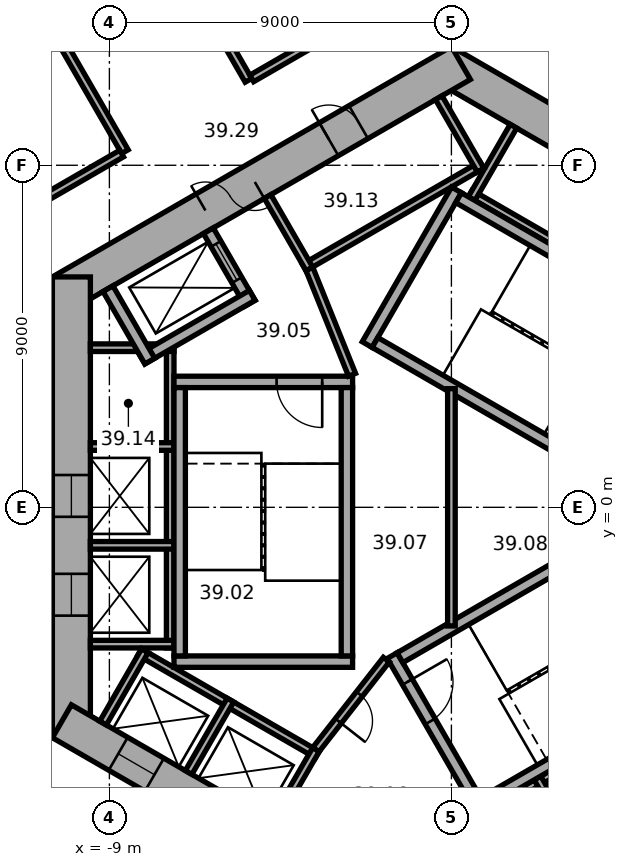
"""IFC4 building model, lengths in metres.
Left out: names, types, materials, properties, quantities, classifications, styles, units other than length and angle.
Written with IfcOpenShell. Run it as: python <this file> out.ifc"""

import sys

from ifc_helpers import new_model, si_unit, direction, frame, frame_2d, origin, place, context, subcontext, project, spatial, rectangle, extrude, element, fill, save


model = new_model("IFC4")
c1 = context("Model", 3, precision=1e-05, world=origin(), true_north=direction((0.0, 1.0)))
c2 = subcontext(c1, "Body", "Model", "MODEL_VIEW")
j1 = project(units=[si_unit("LENGTHUNIT", "METRE"), si_unit("PLANEANGLEUNIT", "RADIAN")], contexts=[c1])
p1 = place(None, origin())
s1 = spatial("IfcSite", under=j1, at=p1, CompositionType="ELEMENT")
p2 = place(p1, origin())
s2 = spatial("IfcBuilding", under=s1, at=p2, CompositionType="ELEMENT")
p3 = place(p2, frame((0.0, 0.0, 161.4)))
s3 = spatial("IfcBuildingStorey", under=s2, at=p3, CompositionType="ELEMENT", Elevation=161.4)
p4 = place(p3, frame((10.25, 5.629, 0.0), z_axis=(0.0, 0.0, 1.0), x_axis=(-0.866022616891, 0.50000482701, 0.0)))
e1 = element("IfcWall", 1, at=p4, inside=s3, PredefinedType="SHEAR", context=c2, shape_type="SweptSolid", body=[
    extrude(rectangle(XDim=12.125, YDim=1.0, at=frame_2d((6.062, 0.0))), origin(), (0.0, 0.0, 1.0), 3.7),
])
p5 = place(p4, frame((2.712, 0.0, 0.0)))
e2 = element("IfcOpeningElement", 2, at=p5, cuts=e1, PredefinedType="OPENING", context=c2, shape_type="SweptSolid", body=[
    extrude(rectangle(XDim=0.9, YDim=2.1, at=frame_2d((0.45, 1.05))), frame((0.0, 0.51, 0.0), z_axis=(0.0, -1.0, 0.0), x_axis=(1.0, 0.0, 0.0)), (0.0, 0.0, 1.0), 1.02),
])
p6 = place(p4, frame((6.612, 0.0, 0.0)))
e3 = element("IfcOpeningElement", 3, at=p6, cuts=e1, PredefinedType="OPENING", context=c2, shape_type="SweptSolid", body=[
    extrude(rectangle(XDim=0.9, YDim=2.1, at=frame_2d((0.45, 1.05))), frame((0.0, 0.51, 0.0), z_axis=(0.0, -1.0, 0.0), x_axis=(1.0, 0.0, 0.0)), (0.0, 0.0, 1.0), 1.02),
])
p7 = place(p3, frame((0.25, 11.691, 0.0), z_axis=(0.0, 0.0, 1.0), x_axis=(-0.866022616891, -0.50000482701, 0.0)))
e4 = element("IfcWall", 4, at=p7, inside=s3, PredefinedType="SHEAR", context=c2, shape_type="SweptSolid", body=[
    extrude(rectangle(XDim=12.125, YDim=1.0, at=frame_2d((6.062, 0.0))), origin(), (0.0, 0.0, 1.0), 3.7),
])
p8 = place(p7, frame((6.262, 0.0, 0.0)))
e5 = element("IfcOpeningElement", 5, at=p8, cuts=e4, PredefinedType="OPENING", context=c2, shape_type="SweptSolid", body=[
    extrude(rectangle(XDim=1.5, YDim=2.1, at=frame_2d((0.75, 1.05))), frame((0.0, 0.51, 0.0), z_axis=(0.0, -1.0, 0.0), x_axis=(1.0, 0.0, 0.0)), (0.0, 0.0, 1.0), 1.02),
])
p9 = place(p7, frame((3.112, 0.0, 0.0)))
e6 = element("IfcOpeningElement", 6, at=p9, cuts=e4, PredefinedType="OPENING", context=c2, shape_type="SweptSolid", body=[
    extrude(rectangle(XDim=0.9, YDim=2.1, at=frame_2d((0.45, 1.05))), frame((0.0, 0.51, 0.0), z_axis=(0.0, -1.0, 0.0), x_axis=(1.0, 0.0, 0.0)), (0.0, 0.0, 1.0), 1.02),
])
p10 = place(p3, frame((-10.0, 6.062, 0.0), z_axis=(0.0, 0.0, 1.0), x_axis=(0.0, -1.0, 0.0)))
e7 = element("IfcWall", 7, at=p10, inside=s3, PredefinedType="SHEAR", context=c2, shape_type="SweptSolid", body=[
    extrude(rectangle(XDim=12.125, YDim=1.0, at=frame_2d((6.062, 0.0))), origin(), (0.0, 0.0, 1.0), 3.7),
])
p11 = place(p10, frame((5.212, 0.0, 0.0)))
e8 = element("IfcOpeningElement", 8, at=p11, cuts=e7, PredefinedType="OPENING", context=c2, shape_type="SweptSolid", body=[
    extrude(rectangle(XDim=1.1, YDim=2.1, at=frame_2d((0.55, 1.05))), frame((0.0, 0.51, 0.0), z_axis=(0.0, -1.0, 0.0), x_axis=(1.0, 0.0, 0.0)), (0.0, 0.0, 1.0), 1.02),
])
p12 = place(p10, frame((7.812, 0.0, 0.0)))
e9 = element("IfcOpeningElement", 9, at=p12, cuts=e7, PredefinedType="OPENING", context=c2, shape_type="SweptSolid", body=[
    extrude(rectangle(XDim=1.1, YDim=2.1, at=frame_2d((0.55, 1.05))), frame((0.0, 0.51, 0.0), z_axis=(0.0, -1.0, 0.0), x_axis=(1.0, 0.0, 0.0)), (0.0, 0.0, 1.0), 1.02),
])
p13 = place(p3, frame((-10.25, -5.629, 0.0), z_axis=(0.0, 0.0, 1.0), x_axis=(0.866022616891, -0.50000482701, 0.0)))
e10 = element("IfcWall", 10, at=p13, inside=s3, PredefinedType="SHEAR", context=c2, shape_type="SweptSolid", body=[
    extrude(rectangle(XDim=12.125, YDim=1.0, at=frame_2d((6.062, 0.0))), origin(), (0.0, 0.0, 1.0), 3.7),
])
p14 = place(p13, frame((6.262, 0.0, 0.0)))
e11 = element("IfcOpeningElement", 11, at=p14, cuts=e10, PredefinedType="OPENING", context=c2, shape_type="SweptSolid", body=[
    extrude(rectangle(XDim=1.5, YDim=2.1, at=frame_2d((0.75, 1.05))), frame((0.0, 0.51, 0.0), z_axis=(0.0, -1.0, 0.0), x_axis=(1.0, 0.0, 0.0)), (0.0, 0.0, 1.0), 1.02),
])
p15 = place(p13, frame((1.712, 0.0, 0.0)))
e12 = element("IfcOpeningElement", 12, at=p15, cuts=e10, PredefinedType="OPENING", context=c2, shape_type="SweptSolid", body=[
    extrude(rectangle(XDim=1.1, YDim=2.1, at=frame_2d((0.55, 1.05))), frame((0.0, 0.51, 0.0), z_axis=(0.0, -1.0, 0.0), x_axis=(1.0, 0.0, 0.0)), (0.0, 0.0, 1.0), 1.02),
])
p16 = place(p13, frame((4.312, 0.0, 0.0)))
e13 = element("IfcOpeningElement", 13, at=p16, cuts=e10, PredefinedType="OPENING", context=c2, shape_type="SweptSolid", body=[
    extrude(rectangle(XDim=1.1, YDim=2.1, at=frame_2d((0.55, 1.05))), frame((0.0, 0.51, 0.0), z_axis=(0.0, -1.0, 0.0), x_axis=(1.0, 0.0, 0.0)), (0.0, 0.0, 1.0), 1.02),
])
p17 = place(p3, frame((-0.25, -11.691, 0.0), z_axis=(0.0, 0.0, 1.0), x_axis=(0.866022616891, 0.50000482701, 0.0)))
e14 = element("IfcWall", 14, at=p17, inside=s3, PredefinedType="SHEAR", context=c2, shape_type="SweptSolid", body=[
    extrude(rectangle(XDim=12.125, YDim=1.0, at=frame_2d((6.062, 0.0))), origin(), (0.0, 0.0, 1.0), 3.7),
])
p18 = place(p17, frame((2.612, 0.0, 0.0)))
e15 = element("IfcOpeningElement", 15, at=p18, cuts=e14, PredefinedType="OPENING", context=c2, shape_type="SweptSolid", body=[
    extrude(rectangle(XDim=1.1, YDim=2.1, at=frame_2d((0.55, 1.05))), frame((0.0, 0.51, 0.0), z_axis=(0.0, -1.0, 0.0), x_axis=(1.0, 0.0, 0.0)), (0.0, 0.0, 1.0), 1.02),
])
p19 = place(p17, frame((5.212, 0.0, 0.0)))
e16 = element("IfcOpeningElement", 16, at=p19, cuts=e14, PredefinedType="OPENING", context=c2, shape_type="SweptSolid", body=[
    extrude(rectangle(XDim=1.1, YDim=2.1, at=frame_2d((0.55, 1.05))), frame((0.0, 0.51, 0.0), z_axis=(0.0, -1.0, 0.0), x_axis=(1.0, 0.0, 0.0)), (0.0, 0.0, 1.0), 1.02),
])
p20 = place(p17, frame((7.812, 0.0, 0.0)))
e17 = element("IfcOpeningElement", 17, at=p20, cuts=e14, PredefinedType="OPENING", context=c2, shape_type="SweptSolid", body=[
    extrude(rectangle(XDim=1.1, YDim=2.1, at=frame_2d((0.55, 1.05))), frame((0.0, 0.51, 0.0), z_axis=(0.0, -1.0, 0.0), x_axis=(1.0, 0.0, 0.0)), (0.0, 0.0, 1.0), 1.02),
])
p21 = place(p3, frame((7.424, 4.259, 0.0), z_axis=(0.0, 0.0, 1.0), x_axis=(-0.866026010844, 0.49999894854, 0.0)))
e18 = element("IfcWall", 18, at=p21, inside=s3, PredefinedType="PARTITIONING", context=c2, shape_type="SweptSolid", body=[
    extrude(rectangle(XDim=8.0, YDim=0.2, at=frame_2d((4.0, 0.0))), origin(), (0.0, 0.0, 1.0), 3.42),
])
p22 = place(p3, frame((0.532, 8.122, 0.0), z_axis=(0.0, 0.0, 1.0), x_axis=(0.500077893725, 0.86598042715, 0.0)))
e19 = element("IfcWall", 19, at=p22, inside=s3, PredefinedType="PARTITIONING", context=c2, shape_type="SweptSolid", body=[
    extrude(rectangle(XDim=2.2, YDim=0.2, at=frame_2d((1.1, 0.0))), origin(), (0.0, 0.0, 1.0), 3.42),
])
p23 = place(p3, frame((0.803, 9.009, 0.0), z_axis=(0.0, 0.0, 1.0), x_axis=(-0.866028230842, -0.499995103361, 0.0)))
e20 = element("IfcWall", 20, at=p23, inside=s3, PredefinedType="PARTITIONING", context=c2, shape_type="SweptSolid", body=[
    extrude(rectangle(XDim=5.4, YDim=0.2, at=frame_2d((2.7, 0.0))), origin(), (0.0, 0.0, 1.0), 3.42),
])
p24 = place(p3, frame((0.767, 8.872, 0.0), z_axis=(0.0, 0.0, 1.0), x_axis=(-0.499994660107, 0.866028486751, 0.0)))
e21 = element("IfcWall", 21, at=p24, inside=s3, PredefinedType="PARTITIONING", context=c2, shape_type="SweptSolid", body=[
    extrude(rectangle(XDim=2.2, YDim=0.2, at=frame_2d((1.1, 0.0))), origin(), (0.0, 0.0, 1.0), 3.42),
])
p25 = place(p3, frame((-3.737, 6.272, 0.0), z_axis=(0.0, 0.0, 1.0), x_axis=(-0.50002983664, 0.866008176907, 0.0)))
e22 = element("IfcWall", 22, at=p25, inside=s3, PredefinedType="PARTITIONING", context=c2, shape_type="SweptSolid", body=[
    extrude(rectangle(XDim=2.2, YDim=0.2, at=frame_2d((1.1, 0.0))), origin(), (0.0, 0.0, 1.0), 3.42),
])
p26 = place(p3, frame((-7.4, 4.3, 0.0), z_axis=(0.0, 0.0, 1.0), x_axis=(0.0, -1.0, 0.0)))
e23 = element("IfcWall", 23, at=p26, inside=s3, PredefinedType="PARTITIONING", context=c2, shape_type="SweptSolid", body=[
    extrude(rectangle(XDim=8.0, YDim=0.2, at=frame_2d((4.0, 0.0))), origin(), (0.0, 0.0, 1.0), 3.42),
])
for number, where, z_axis, x_axis in (
    (24, (-7.3, 4.2, 0.0), (0.0, 0.0, 1.0), (-1.0, 0.0, 0.0)),
    (25, (-7.3, 1.6, 0.0), (0.0, 0.0, 1.0), (-1.0, 0.0, 0.0)),
    (26, (-7.3, -1.0, 0.0), (0.0, 0.0, 1.0), (-1.0, 0.0, 0.0)),
    (27, (-7.3, -3.6, 0.0), (0.0, 0.0, 1.0), (-1.0, 0.0, 0.0)),
):
    element("IfcWall", number, at=place(p3, frame(where, z_axis=z_axis, x_axis=x_axis)), inside=s3, PredefinedType="PARTITIONING", context=c2, shape_type="SweptSolid", body=[
        extrude(rectangle(XDim=2.2, YDim=0.2, at=frame_2d((1.1, 0.0))), origin(), (0.0, 0.0, 1.0), 3.42),
    ])
p27 = place(p3, frame((-8.203, -3.809, 0.0), z_axis=(0.0, 0.0, 1.0), x_axis=(0.866028230842, -0.499995103361, 0.0)))
e28 = element("IfcWall", 28, at=p27, inside=s3, PredefinedType="PARTITIONING", context=c2, shape_type="SweptSolid", body=[
    extrude(rectangle(XDim=5.4, YDim=0.2, at=frame_2d((2.7, 0.0))), origin(), (0.0, 0.0, 1.0), 3.42),
])
for number, where, z_axis, x_axis in (
    (29, (-8.067, -3.772, 0.0), (0.0, 0.0, 1.0), (-0.5, -0.866, 0.0)),
    (30, (-5.815, -5.072, 0.0), (0.0, 0.0, 1.0), (-0.5, -0.866, 0.0)),
):
    element("IfcWall", number, at=place(p3, frame(where, z_axis=z_axis, x_axis=x_axis)), inside=s3, PredefinedType="PARTITIONING", context=c2, shape_type="SweptSolid", body=[
        extrude(rectangle(XDim=2.2, YDim=0.2, at=frame_2d((1.1, 0.0))), origin(), (0.0, 0.0, 1.0), 3.42),
    ])
p28 = place(p3, frame((-3.563, -6.372, 0.0), z_axis=(0.0, 0.0, 1.0), x_axis=(-0.499994660107, -0.866028486751, 0.0)))
e31 = element("IfcWall", 31, at=p28, inside=s3, PredefinedType="PARTITIONING", context=c2, shape_type="SweptSolid", body=[
    extrude(rectangle(XDim=2.2, YDim=0.2, at=frame_2d((1.1, 0.0))), origin(), (0.0, 0.0, 1.0), 3.42),
])
p29 = place(p3, frame((-0.024, -8.559, 0.0), z_axis=(0.0, 0.0, 1.0), x_axis=(0.866026010844, 0.49999894854, 0.0)))
e32 = element("IfcWall", 32, at=p29, inside=s3, PredefinedType="PARTITIONING", context=c2, shape_type="SweptSolid", body=[
    extrude(rectangle(XDim=8.0, YDim=0.2, at=frame_2d((4.0, 0.0))), origin(), (0.0, 0.0, 1.0), 3.42),
])
p30 = place(p3, frame((2.264, -7.122, 0.0), z_axis=(0.0, 0.0, 1.0), x_axis=(0.500077893725, -0.86598042715, 0.0)))
e33 = element("IfcWall", 33, at=p30, inside=s3, PredefinedType="PARTITIONING", context=c2, shape_type="SweptSolid", body=[
    extrude(rectangle(XDim=2.2, YDim=0.2, at=frame_2d((1.1, 0.0))), origin(), (0.0, 0.0, 1.0), 3.42),
])
p31 = place(p3, frame((-2.216, 4.282, 0.0), z_axis=(0.0, 0.0, 1.0), x_axis=(0.499977259774, 0.866038532462, 0.0)))
e34 = element("IfcWall", 34, at=p31, inside=s3, PredefinedType="SHEAR", context=c2, shape_type="SweptSolid", body=[
    extrude(rectangle(XDim=4.7, YDim=0.3, at=frame_2d((2.35, 0.0))), origin(), (0.0, 0.0, 1.0), 3.42),
])
for number, where, z_axis, x_axis in (
    (35, (4.103, 0.807, 0.0), (0.0, 0.0, 1.0), (-0.866, 0.5, 0.0)),
    (36, (6.303, 4.617, 0.0), (0.0, 0.0, 1.0), (-0.866, 0.5, 0.0)),
):
    element("IfcWall", number, at=place(p3, frame(where, z_axis=z_axis, x_axis=x_axis)), inside=s3, PredefinedType="SHEAR", context=c2, shape_type="SweptSolid", body=[
        extrude(rectangle(XDim=7.06, YDim=0.3, at=frame_2d((3.53, 0.0))), origin(), (0.0, 0.0, 1.0), 3.42),
    ])
p32 = place(p3, frame((-2.6, 3.3, 0.0), z_axis=(0.0, 0.0, 1.0), x_axis=(-1.0, 0.0, 0.0)))
e37 = element("IfcWall", 37, at=p32, inside=s3, PredefinedType="SHEAR", context=c2, shape_type="SweptSolid", body=[
    extrude(rectangle(XDim=4.7, YDim=0.3, at=frame_2d((2.35, 0.0))), origin(), (0.0, 0.0, 1.0), 3.42),
])
p33 = place(p32, frame((0.8, 0.0, 0.0)))
e38 = element("IfcOpeningElement", 38, at=p33, cuts=e37, PredefinedType="OPENING", context=c2, shape_type="SweptSolid", body=[
    extrude(rectangle(XDim=1.2, YDim=2.1, at=frame_2d((0.6, 1.05))), frame((0.0, 0.16, 0.0), z_axis=(0.0, -1.0, 0.0), x_axis=(1.0, 0.0, 0.0)), (0.0, 0.0, 1.0), 0.32),
])
p34 = place(p3, frame((-2.6, -4.06, 0.0), z_axis=(0.0, 0.0, 1.0), x_axis=(-1.0, 0.0, 0.0)))
e39 = element("IfcWall", 39, at=p34, inside=s3, PredefinedType="SHEAR", context=c2, shape_type="SweptSolid", body=[
    extrude(rectangle(XDim=4.7, YDim=0.3, at=frame_2d((2.35, 0.0))), origin(), (0.0, 0.0, 1.0), 3.42),
])
for number, where, z_axis, x_axis in (
    (40, (-2.75, 3.15, 0.0), (0.0, 0.0, 1.0), (0.0, -1.0, 0.0)),
    (41, (-7.15, 3.15, 0.0), (0.0, 0.0, 1.0), (0.0, -1.0, 0.0)),
):
    element("IfcWall", number, at=place(p3, frame(where, z_axis=z_axis, x_axis=x_axis)), inside=s3, PredefinedType="SHEAR", context=c2, shape_type="SweptSolid", body=[
        extrude(rectangle(XDim=7.06, YDim=0.3, at=frame_2d((3.53, 0.0))), origin(), (0.0, 0.0, 1.0), 3.42),
    ])
p35 = place(p3, frame((-1.558, -3.902, 0.0), z_axis=(0.0, 0.0, 1.0), x_axis=(0.499977259774, -0.866038532462, 0.0)))
e42 = element("IfcWall", 42, at=p35, inside=s3, PredefinedType="SHEAR", context=c2, shape_type="SweptSolid", body=[
    extrude(rectangle(XDim=4.7, YDim=0.3, at=frame_2d((2.35, 0.0))), origin(), (0.0, 0.0, 1.0), 3.42),
])
p36 = place(p35, frame((0.8, 0.0, 0.0)))
e43 = element("IfcOpeningElement", 43, at=p36, cuts=e42, PredefinedType="OPENING", context=c2, shape_type="SweptSolid", body=[
    extrude(rectangle(XDim=1.2, YDim=2.1, at=frame_2d((0.6, 1.05))), frame((0.0, 0.16, 0.0), z_axis=(0.0, -1.0, 0.0), x_axis=(1.0, 0.0, 0.0)), (0.0, 0.0, 1.0), 0.32),
])
for number, where, z_axis, x_axis in (
    (44, (-1.353, -3.957, 0.0), (0.0, 0.0, 1.0), (0.866, 0.5, 0.0)),
    (45, (0.847, -7.767, 0.0), (0.0, 0.0, 1.0), (0.866, 0.5, 0.0)),
):
    element("IfcWall", number, at=place(p3, frame(where, z_axis=z_axis, x_axis=x_axis)), inside=s3, PredefinedType="SHEAR", context=c2, shape_type="SweptSolid", body=[
        extrude(rectangle(XDim=7.06, YDim=0.3, at=frame_2d((3.53, 0.0))), origin(), (0.0, 0.0, 1.0), 3.42),
    ])
p37 = place(p3, frame((-5.295, 5.372, 0.0), z_axis=(0.0, 0.0, 1.0), x_axis=(-0.500077893725, 0.86598042715, 0.0)))
e46 = element("IfcWall", 46, at=p37, inside=s3, PredefinedType="SHEAR", context=c2, shape_type="SweptSolid", body=[
    extrude(rectangle(XDim=2.2, YDim=0.3, at=frame_2d((1.1, 0.0))), origin(), (0.0, 0.0, 1.0), 3.42),
])
p38 = place(p37, frame((0.7, 0.0, 0.0)))
e47 = element("IfcOpeningElement", 47, at=p38, cuts=e46, PredefinedType="OPENING", context=c2, shape_type="SweptSolid", body=[
    extrude(rectangle(XDim=1.1, YDim=2.1, at=frame_2d((0.55, 1.05))), frame((0.0, 0.16, 0.0), z_axis=(0.0, -1.0, 0.0), x_axis=(1.0, 0.0, 0.0)), (0.0, 0.0, 1.0), 0.32),
])
p39 = place(p3, frame((-5.24, 5.577, 0.0), z_axis=(0.0, 0.0, 1.0), x_axis=(-0.866014461049, -0.500018952895, 0.0)))
e48 = element("IfcWall", 48, at=p39, inside=s3, PredefinedType="SHEAR", context=c2, shape_type="SweptSolid", body=[
    extrude(rectangle(XDim=3.35, YDim=0.3, at=frame_2d((1.675, 0.0))), origin(), (0.0, 0.0, 1.0), 3.42),
])
p40 = place(p3, frame((-7.937, 3.847, 0.0), z_axis=(0.0, 0.0, 1.0), x_axis=(-0.50002983664, 0.866008176907, 0.0)))
e49 = element("IfcWall", 49, at=p40, inside=s3, PredefinedType="SHEAR", context=c2, shape_type="SweptSolid", body=[
    extrude(rectangle(XDim=2.2, YDim=0.3, at=frame_2d((1.1, 0.0))), origin(), (0.0, 0.0, 1.0), 3.42),
])
p41 = place(p3, frame((-2.615, 3.487, 0.0), z_axis=(0.0, 0.0, 1.0), x_axis=(-0.373576831041, 0.92759924068, 0.0)))
e50 = element("IfcWall", 50, at=p41, inside=s3, PredefinedType="PARTITIONING", context=c2, shape_type="SweptSolid", body=[
    extrude(rectangle(XDim=3.002, YDim=0.2, at=frame_2d((1.501, 0.0))), origin(), (0.0, 0.0, 1.0), 3.42),
])
p42 = place(p3, frame((-1.712, -4.008, 0.0), z_axis=(0.0, 0.0, 1.0), x_axis=(-0.616549420702, -0.787316208287, 0.0)))
e51 = element("IfcWall", 51, at=p42, inside=s3, PredefinedType="PARTITIONING", context=c2, shape_type="SweptSolid", body=[
    extrude(rectangle(XDim=3.002, YDim=0.2, at=frame_2d((1.501, 0.0))), origin(), (0.0, 0.0, 1.0), 3.42),
])
p43 = place(p42, frame((1.15, 0.0, 0.0)))
e52 = element("IfcOpeningElement", 52, at=p43, cuts=e51, PredefinedType="OPENING", context=c2, shape_type="SweptSolid", body=[
    extrude(rectangle(XDim=0.9, YDim=2.1, at=frame_2d((0.45, 1.05))), frame((0.0, 0.11, 0.0), z_axis=(0.0, -1.0, 0.0), x_axis=(1.0, 0.0, 0.0)), (0.0, 0.0, 1.0), 0.22),
])
p44 = place(p3, frame((0.0, -3.122, 0.0), z_axis=(0.0, 0.0, 1.0), x_axis=(0.0, 1.0, 0.0)))
e53 = element("IfcWall", 53, at=p44, inside=s3, PredefinedType="PARTITIONING", context=c2, shape_type="SweptSolid", body=[
    extrude(rectangle(XDim=6.245, YDim=0.2, at=frame_2d((3.122, 0.0))), origin(), (0.0, 0.0, 1.0), 3.42),
])
p45 = place(p3, frame((-12.766, 16.589, 0.0), z_axis=(0.0, 0.0, 1.0), x_axis=(0.500010139422, -0.866019549707, 0.0)))
e54 = element("IfcWall", 54, at=p45, inside=s3, PredefinedType="PARTITIONING", context=c2, shape_type="SweptSolid", body=[
    extrude(rectangle(XDim=8.35, YDim=0.2, at=frame_2d((4.175, 0.0))), origin(), (0.0, 0.0, 1.0), 3.42),
])
p46 = place(p45, frame((3.675, 0.0, 0.0)))
e55 = element("IfcOpeningElement", 55, at=p46, cuts=e54, PredefinedType="OPENING", context=c2, shape_type="SweptSolid", body=[
    extrude(rectangle(XDim=1.0, YDim=2.1, at=frame_2d((0.5, 1.05))), frame((0.0, 0.11, 0.0), z_axis=(0.0, -1.0, 0.0), x_axis=(1.0, 0.0, 0.0)), (0.0, 0.0, 1.0), 0.22),
])
p47 = place(p3, frame((-9.515, 18.466, 0.0), z_axis=(0.0, 0.0, 1.0), x_axis=(0.500010139422, -0.866019549707, 0.0)))
e56 = element("IfcWall", 56, at=p47, inside=s3, PredefinedType="PARTITIONING", context=c2, shape_type="SweptSolid", body=[
    extrude(rectangle(XDim=8.35, YDim=0.2, at=frame_2d((4.175, 0.0))), origin(), (0.0, 0.0, 1.0), 2.87),
])
p48 = place(p47, frame((3.675, 0.0, 0.0)))
e57 = element("IfcOpeningElement", 57, at=p48, cuts=e56, PredefinedType="OPENING", context=c2, shape_type="SweptSolid", body=[
    extrude(rectangle(XDim=1.0, YDim=2.1, at=frame_2d((0.5, 1.05))), frame((0.0, 0.11, 0.0), z_axis=(0.0, -1.0, 0.0), x_axis=(1.0, 0.0, 0.0)), (0.0, 0.0, 1.0), 0.22),
])
p49 = place(p3, frame((-8.678, 9.308, 0.0), z_axis=(0.0, 0.0, 1.0), x_axis=(-0.866000359435, -0.500043375578, 0.0)))
e58 = element("IfcWall", 58, at=p49, inside=s3, PredefinedType="PARTITIONING", context=c2, shape_type="SweptSolid", body=[
    extrude(rectangle(XDim=3.161, YDim=0.2, at=frame_2d((1.581, 0.0))), origin(), (0.0, 0.0, 1.0), 3.42),
])
p50 = place(p3, frame((-0.95, 13.77, 0.0), z_axis=(0.0, 0.0, 1.0), x_axis=(-0.866036689987, -0.499980451214, 0.0)))
e59 = element("IfcWall", 59, at=p50, inside=s3, PredefinedType="PARTITIONING", context=c2, shape_type="SweptSolid", body=[
    extrude(rectangle(XDim=4.969, YDim=0.2, at=frame_2d((2.485, 0.0))), origin(), (0.0, 0.0, 1.0), 3.42),
])
p51 = place(p3, frame((9.224, 8.993, 0.0), z_axis=(0.0, 0.0, 1.0), x_axis=(-0.866031754707, 0.499988999718, 0.0)))
e60 = element("IfcWall", 60, at=p51, inside=s3, PredefinedType="PARTITIONING", context=c2, shape_type="SweptSolid", body=[
    extrude(rectangle(XDim=9.514, YDim=0.2, at=frame_2d((4.757, 0.0))), origin(), (0.0, 0.0, 1.0), 3.42),
])
p52 = place(p51, frame((3.848, 0.0, 0.0)))
e61 = element("IfcOpeningElement", 61, at=p52, cuts=e60, PredefinedType="OPENING", context=c2, shape_type="SweptSolid", body=[
    extrude(rectangle(XDim=1.0, YDim=2.1, at=frame_2d((0.5, 1.05))), frame((0.0, 0.11, 0.0), z_axis=(0.0, -1.0, 0.0), x_axis=(1.0, 0.0, 0.0)), (0.0, 0.0, 1.0), 0.22),
])
p53 = place(p8, origin())
e62 = element("IfcDoor", 62, at=p53, inside=s3, OperationType="DOUBLE_DOOR_SINGLE_SWING", PredefinedType="DOOR", context=c2, shape_type="SweptSolid", body=[
    extrude(rectangle(XDim=1.5, YDim=2.1, at=frame_2d((0.75, 1.05))), frame((0.0, 0.025, 0.0), z_axis=(0.0, -1.0, 0.0), x_axis=(1.0, 0.0, 0.0)), (0.0, 0.0, 1.0), 0.05),
])
fill(e5, e62)
p54 = place(p33, origin())
e63 = element("IfcDoor", 63, at=p54, inside=s3, OperationType="SINGLE_SWING_RIGHT", PredefinedType="DOOR", context=c2, shape_type="SweptSolid", body=[
    extrude(rectangle(XDim=1.2, YDim=2.1, at=frame_2d((0.6, 1.05))), frame((0.0, 0.025, 0.0), z_axis=(0.0, -1.0, 0.0), x_axis=(1.0, 0.0, 0.0)), (0.0, 0.0, 1.0), 0.05),
])
fill(e38, e63)
p55 = place(p36, origin())
e64 = element("IfcDoor", 64, at=p55, inside=s3, OperationType="SINGLE_SWING_RIGHT", PredefinedType="DOOR", context=c2, shape_type="SweptSolid", body=[
    extrude(rectangle(XDim=1.2, YDim=2.1, at=frame_2d((0.6, 1.05))), frame((0.0, 0.025, 0.0), z_axis=(0.0, -1.0, 0.0), x_axis=(1.0, 0.0, 0.0)), (0.0, 0.0, 1.0), 0.05),
])
fill(e43, e64)
p56 = place(p43, origin())
e65 = element("IfcDoor", 65, at=p56, inside=s3, OperationType="SINGLE_SWING_LEFT", PredefinedType="DOOR", context=c2, shape_type="SweptSolid", body=[
    extrude(rectangle(XDim=0.9, YDim=2.1, at=frame_2d((0.45, 1.05))), frame((0.0, 0.025, 0.0), z_axis=(0.0, -1.0, 0.0), x_axis=(1.0, 0.0, 0.0)), (0.0, 0.0, 1.0), 0.05),
])
fill(e52, e65)
p57 = place(p9, origin())
e66 = element("IfcDoor", 66, at=p57, inside=s3, OperationType="SINGLE_SWING_LEFT", PredefinedType="DOOR", context=c2, shape_type="SweptSolid", body=[
    extrude(rectangle(XDim=0.9, YDim=2.1, at=frame_2d((0.45, 1.05))), frame((0.0, 0.025, 0.0), z_axis=(0.0, -1.0, 0.0), x_axis=(1.0, 0.0, 0.0)), (0.0, 0.0, 1.0), 0.05),
])
fill(e6, e66)
p58 = place(p38, origin())
e67 = element("IfcDoor", 67, at=p58, inside=s3, OperationType="DOUBLE_DOOR_SLIDING", PredefinedType="DOOR", context=c2, shape_type="SweptSolid", body=[
    extrude(rectangle(XDim=1.1, YDim=2.1, at=frame_2d((0.55, 1.05))), frame((0.0, 0.025, 0.0), z_axis=(0.0, -1.0, 0.0), x_axis=(1.0, 0.0, 0.0)), (0.0, 0.0, 1.0), 0.05),
])
fill(e47, e67)
p59 = place(p11, origin())
e68 = element("IfcDoor", 68, at=p59, inside=s3, OperationType="DOUBLE_DOOR_SLIDING", PredefinedType="DOOR", context=c2, shape_type="SweptSolid", body=[
    extrude(rectangle(XDim=1.1, YDim=2.1, at=frame_2d((0.55, 1.05))), frame((0.0, 0.025, 0.0), z_axis=(0.0, -1.0, 0.0), x_axis=(1.0, 0.0, 0.0)), (0.0, 0.0, 1.0), 0.05),
])
fill(e8, e68)
p60 = place(p12, origin())
e69 = element("IfcDoor", 69, at=p60, inside=s3, OperationType="DOUBLE_DOOR_SLIDING", PredefinedType="DOOR", context=c2, shape_type="SweptSolid", body=[
    extrude(rectangle(XDim=1.1, YDim=2.1, at=frame_2d((0.55, 1.05))), frame((0.0, 0.025, 0.0), z_axis=(0.0, -1.0, 0.0), x_axis=(1.0, 0.0, 0.0)), (0.0, 0.0, 1.0), 0.05),
])
fill(e9, e69)
p61 = place(p15, origin())
e70 = element("IfcDoor", 70, at=p61, inside=s3, OperationType="DOUBLE_DOOR_SLIDING", PredefinedType="DOOR", context=c2, shape_type="SweptSolid", body=[
    extrude(rectangle(XDim=1.1, YDim=2.1, at=frame_2d((0.55, 1.05))), frame((0.0, 0.025, 0.0), z_axis=(0.0, -1.0, 0.0), x_axis=(1.0, 0.0, 0.0)), (0.0, 0.0, 1.0), 0.05),
])
fill(e12, e70)
save(model, sys.argv[1])
